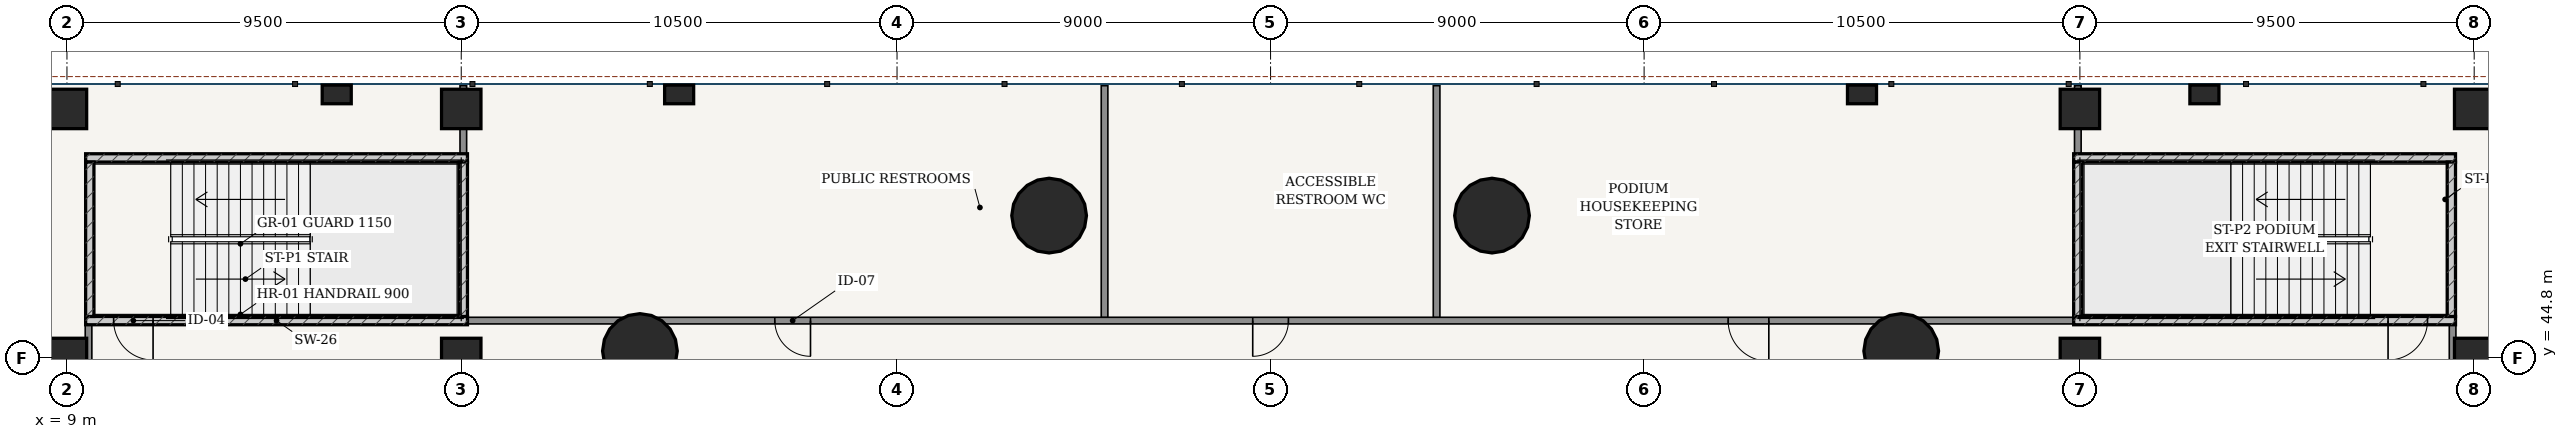
"""IFC4 building model, lengths in metres.
Left out: names, types, materials, properties, quantities, classifications, styles, units other than length and angle.
Written with IfcOpenShell. Run it as: python <this file> out.ifc"""

import sys

from ifc_helpers import new_model, si_unit, direction, frame, frame_2d, origin, origin_2d, place, context, subcontext, project, spatial, rectangle, hollow_circle, extrude, source, transform, mapped, element, fill, save


model = new_model("IFC4")
c1 = context("Model", 3, precision=1e-05, world=origin(), true_north=direction((-0.2419218956, 0.970295726276)))
c2 = subcontext(c1, "Body", "Model", "MODEL_VIEW")
j1 = project(units=[si_unit("LENGTHUNIT", "METRE"), si_unit("PLANEANGLEUNIT", "RADIAN")], contexts=[c1])
p1 = place(None, origin())
s1 = spatial("IfcSite", under=j1, at=p1, CompositionType="ELEMENT")
p2 = place(p1, origin())
s2 = spatial("IfcBuilding", under=s1, at=p2, CompositionType="ELEMENT")
p3 = place(p2, frame((0.0, 0.0, 14.4)))
s3 = spatial("IfcBuildingStorey", under=s2, at=p3, CompositionType="ELEMENT", Elevation=14.4)
p4 = place(p3, frame((9.45, 45.7, 0.0), z_axis=(0.0, 0.0, 1.0), x_axis=(1.0, 0.0, 0.0)))
e1 = element("IfcWall", 1, at=p4, inside=s3, PredefinedType="SOLIDWALL", context=c2, shape_type="SweptSolid", body=[
    extrude(rectangle(XDim=9.2, YDim=0.2, at=frame_2d((4.6, 0.0))), origin(), (0.0, 0.0, 1.0), 4.05),
])
p5 = place(p4, frame((0.675, 0.0, 0.0)))
e2 = element("IfcOpeningElement", 2, at=p5, cuts=e1, PredefinedType="OPENING", context=c2, shape_type="SweptSolid", body=[
    extrude(rectangle(XDim=0.95, YDim=2.15, at=frame_2d((0.475, 1.075))), frame((0.0, 0.11, 0.0), z_axis=(0.0, -1.0, 0.0), x_axis=(1.0, 0.0, 0.0)), (0.0, 0.0, 1.0), 0.22),
])
p6 = place(p3, frame((9.45, 49.62, 0.0), z_axis=(0.0, 0.0, 1.0), x_axis=(1.0, 0.0, 0.0)))
e3 = element("IfcWall", 3, at=p6, inside=s3, PredefinedType="SOLIDWALL", context=c2, shape_type="SweptSolid", body=[
    extrude(rectangle(XDim=9.2, YDim=0.2, at=frame_2d((4.6, 0.0))), origin(), (0.0, 0.0, 1.0), 4.05),
])
for number, where, z_axis, x_axis in (
    (4, (9.55, 45.8, 0.0), (0.0, 0.0, 1.0), (0.0, 1.0, 0.0)),
    (5, (18.55, 45.8, 0.0), (0.0, 0.0, 1.0), (0.0, 1.0, 0.0)),
):
    element("IfcWall", number, at=place(p3, frame(where, z_axis=z_axis, x_axis=x_axis)), inside=s3, PredefinedType="SOLIDWALL", context=c2, shape_type="SweptSolid", body=[
        extrude(rectangle(XDim=3.72, YDim=0.2, at=frame_2d((1.86, 0.0))), origin(), (0.0, 0.0, 1.0), 4.05),
    ])
p7 = place(p3, frame((57.35, 45.7, 0.0), z_axis=(0.0, 0.0, 1.0), x_axis=(1.0, 0.0, 0.0)))
e6 = element("IfcWall", 6, at=p7, inside=s3, PredefinedType="SOLIDWALL", context=c2, shape_type="SweptSolid", body=[
    extrude(rectangle(XDim=9.2, YDim=0.2, at=frame_2d((4.6, 0.0))), origin(), (0.0, 0.0, 1.0), 4.05),
])
p8 = place(p7, frame((7.575, 0.0, 0.0)))
e7 = element("IfcOpeningElement", 7, at=p8, cuts=e6, PredefinedType="OPENING", context=c2, shape_type="SweptSolid", body=[
    extrude(rectangle(XDim=0.95, YDim=2.15, at=frame_2d((0.475, 1.075))), frame((0.0, 0.11, 0.0), z_axis=(0.0, -1.0, 0.0), x_axis=(1.0, 0.0, 0.0)), (0.0, 0.0, 1.0), 0.22),
])
p9 = place(p3, frame((57.35, 49.62, 0.0), z_axis=(0.0, 0.0, 1.0), x_axis=(1.0, 0.0, 0.0)))
e8 = element("IfcWall", 8, at=p9, inside=s3, PredefinedType="SOLIDWALL", context=c2, shape_type="SweptSolid", body=[
    extrude(rectangle(XDim=9.2, YDim=0.2, at=frame_2d((4.6, 0.0))), origin(), (0.0, 0.0, 1.0), 4.05),
])
for number, where, z_axis, x_axis in (
    (9, (57.45, 45.8, 0.0), (0.0, 0.0, 1.0), (0.0, 1.0, 0.0)),
    (10, (66.45, 45.8, 0.0), (0.0, 0.0, 1.0), (0.0, 1.0, 0.0)),
):
    element("IfcWall", number, at=place(p3, frame(where, z_axis=z_axis, x_axis=x_axis)), inside=s3, PredefinedType="SOLIDWALL", context=c2, shape_type="SweptSolid", body=[
        extrude(rectangle(XDim=3.72, YDim=0.2, at=frame_2d((1.86, 0.0))), origin(), (0.0, 0.0, 1.0), 4.05),
    ])
for number, where, z_axis, x_axis in (
    (11, (53.195, 44.968, 0.0), (0.0, 0.0, 1.0), (1.0, 0.0, 0.0)),
    (12, (43.336, 48.23, 0.0), (0.0, 0.0, 1.0), (1.0, 0.0, 0.0)),
    (13, (32.664, 48.23, 0.0), (0.0, 0.0, 1.0), (1.0, 0.0, 0.0)),
    (14, (22.805, 44.968, 0.0), (0.0, 0.0, 1.0), (1.0, 0.0, 0.0)),
):
    element("IfcColumn", number, at=place(p3, frame(where, z_axis=z_axis, x_axis=x_axis)), inside=s3, PredefinedType="COLUMN", context=c2, shape_type="SweptSolid", body=[
        extrude(hollow_circle(Radius=0.9, WallThickness=0.055, at=origin_2d()), origin(), (0.0, 0.0, 1.0), 4.5),
    ])
for number, where, z_axis, x_axis in (
    (15, (9.0, 44.8, 0.0), (0.0, 0.0, 1.0), (1.0, 0.0, 0.0)),
    (16, (9.0, 50.8, 0.0), (0.0, 0.0, 1.0), (1.0, 0.0, 0.0)),
    (17, (18.5, 44.8, 0.0), (0.0, 0.0, 1.0), (1.0, 0.0, 0.0)),
    (18, (18.5, 50.8, 0.0), (0.0, 0.0, 1.0), (1.0, 0.0, 0.0)),
    (19, (57.5, 44.8, 0.0), (0.0, 0.0, 1.0), (1.0, 0.0, 0.0)),
    (20, (57.5, 50.8, 0.0), (0.0, 0.0, 1.0), (1.0, 0.0, 0.0)),
    (21, (67.0, 44.8, 0.0), (0.0, 0.0, 1.0), (1.0, 0.0, 0.0)),
    (22, (67.0, 50.8, 0.0), (0.0, 0.0, 1.0), (1.0, 0.0, 0.0)),
):
    element("IfcColumn", number, at=place(p3, frame(where, z_axis=z_axis, x_axis=x_axis)), inside=s3, PredefinedType="COLUMN", context=c2, shape_type="SweptSolid", body=[
        extrude(rectangle(XDim=0.95, YDim=0.95, at=origin_2d()), origin(), (0.0, 0.0, 1.0), 4.5),
    ])
for number, where, z_axis, x_axis in (
    (23, (15.5, 51.15, 0.0), (0.0, 0.0, 1.0), (1.0, 0.0, 0.0)),
    (24, (23.75, 51.15, 0.0), (0.0, 0.0, 1.0), (1.0, 0.0, 0.0)),
    (25, (52.25, 51.15, 0.0), (0.0, 0.0, 1.0), (1.0, 0.0, 0.0)),
    (26, (60.5, 51.15, 0.0), (0.0, 0.0, 1.0), (1.0, 0.0, 0.0)),
):
    element("IfcColumn", number, at=place(p3, frame(where, z_axis=z_axis, x_axis=x_axis)), inside=s3, PredefinedType="PILASTER", context=c2, shape_type="SweptSolid", body=[
        extrude(rectangle(XDim=0.7, YDim=0.45, at=origin_2d()), origin(), (0.0, 0.0, 1.0), 4.5),
    ])
for number, where, z_axis, x_axis in (
    (27, (9.52, 36.92, 0.0), (0.0, 0.0, 1.0), (0.0, 1.0, 0.0)),
    (28, (66.48, 36.92, 0.0), (0.0, 0.0, 1.0), (0.0, 1.0, 0.0)),
):
    element("IfcWall", number, at=place(p3, frame(where, z_axis=z_axis, x_axis=x_axis)), inside=s3, PredefinedType="PARTITIONING", context=c2, shape_type="SweptSolid", body=[
        extrude(rectangle(XDim=8.78, YDim=0.16, at=frame_2d((4.39, 0.0))), origin(), (0.0, 0.0, 1.0), 2.435),
    ])
p10 = place(p3, frame((18.55, 45.7, 0.0), z_axis=(0.0, 0.0, 1.0), x_axis=(1.0, 0.0, 0.0)))
e29 = element("IfcWall", 29, at=p10, inside=s3, PredefinedType="PARTITIONING", context=c2, shape_type="SweptSolid", body=[
    extrude(rectangle(XDim=38.9, YDim=0.16, at=frame_2d((19.45, 0.0))), origin(), (0.0, 0.0, 1.0), 3.4),
])
p11 = place(p10, frame((7.505, 0.0, 0.0)))
e30 = element("IfcOpeningElement", 30, at=p11, cuts=e29, PredefinedType="OPENING", context=c2, shape_type="SweptSolid", body=[
    extrude(rectangle(XDim=0.86, YDim=2.1, at=frame_2d((0.43, 1.05))), frame((0.0, 0.09, 0.0), z_axis=(0.0, -1.0, 0.0), x_axis=(1.0, 0.0, 0.0)), (0.0, 0.0, 1.0), 0.18),
])
p12 = place(p10, frame((19.02, 0.0, 0.0)))
e31 = element("IfcOpeningElement", 31, at=p12, cuts=e29, PredefinedType="OPENING", context=c2, shape_type="SweptSolid", body=[
    extrude(rectangle(XDim=0.86, YDim=2.1, at=frame_2d((0.43, 1.05))), frame((0.0, 0.09, 0.0), z_axis=(0.0, -1.0, 0.0), x_axis=(1.0, 0.0, 0.0)), (0.0, 0.0, 1.0), 0.18),
])
p13 = place(p10, frame((30.475, 0.0, 0.0)))
e32 = element("IfcOpeningElement", 32, at=p13, cuts=e29, PredefinedType="OPENING", context=c2, shape_type="SweptSolid", body=[
    extrude(rectangle(XDim=0.98, YDim=2.2, at=frame_2d((0.49, 1.1))), frame((0.0, 0.09, 0.0), z_axis=(0.0, -1.0, 0.0), x_axis=(1.0, 0.0, 0.0)), (0.0, 0.0, 1.0), 0.18),
])
for number, where, z_axis, x_axis in (
    (33, (34.0, 45.782, 0.0), (0.0, 0.0, 1.0), (0.0, 1.0, 0.0)),
    (34, (42.0, 45.782, 0.0), (0.0, 0.0, 1.0), (0.0, 1.0, 0.0)),
):
    element("IfcWall", number, at=place(p3, frame(where, z_axis=z_axis, x_axis=x_axis)), inside=s3, PredefinedType="PARTITIONING", context=c2, shape_type="SweptSolid", body=[
        extrude(rectangle(XDim=5.578, YDim=0.16, at=frame_2d((2.789, 0.0))), origin(), (0.0, 0.0, 1.0), 3.492),
    ])
for number, where, z_axis, x_axis in (
    (35, (18.55, 49.722, 0.0), (0.0, 0.0, 1.0), (0.0, 1.0, 0.0)),
    (36, (57.45, 49.722, 0.0), (0.0, 0.0, 1.0), (0.0, 1.0, 0.0)),
):
    element("IfcWall", number, at=place(p3, frame(where, z_axis=z_axis, x_axis=x_axis)), inside=s3, PredefinedType="PARTITIONING", context=c2, shape_type="SweptSolid", body=[
        extrude(rectangle(XDim=1.638, YDim=0.16, at=frame_2d((0.819, 0.0))), origin(), (0.0, 0.0, 1.0), 3.085),
    ])
m1 = source(origin(), c2, "Body", "SweptSolid", [
    extrude(rectangle(XDim=0.95, YDim=2.15, at=frame_2d((0.475, 1.075))), frame((0.0, 0.025, 0.0), z_axis=(0.0, -1.0, 0.0), x_axis=(1.0, 0.0, 0.0)), (0.0, 0.0, 1.0), 0.05),
])
p14 = place(p5, frame((0.95, 0.0, 0.0), z_axis=(0.0, 0.0, 1.0), x_axis=(-1.0, 0.0, 0.0)))
e37 = element("IfcDoor", 37, at=p14, inside=s3, OperationType="SINGLE_SWING_LEFT", PredefinedType="DOOR", context=c2, shape_type="MappedRepresentation", body=[
    mapped(m1, transform((0.0, 0.0, 0.0), scale=1.0)),
])
fill(e2, e37)
p15 = place(p8, frame((0.95, 0.0, 0.0), z_axis=(0.0, 0.0, 1.0), x_axis=(-1.0, 0.0, 0.0)))
e38 = element("IfcDoor", 38, at=p15, inside=s3, OperationType="SINGLE_SWING_RIGHT", PredefinedType="DOOR", context=c2, shape_type="MappedRepresentation", body=[
    mapped(m1, transform((0.0, 0.0, 0.0), scale=1.0)),
])
fill(e7, e38)
m2 = source(origin(), c2, "Body", "SweptSolid", [
    extrude(rectangle(XDim=0.86, YDim=2.1, at=frame_2d((0.43, 1.05))), frame((0.0, 0.025, 0.0), z_axis=(0.0, -1.0, 0.0), x_axis=(1.0, 0.0, 0.0)), (0.0, 0.0, 1.0), 0.05),
])
p16 = place(p11, frame((0.86, 0.0, 0.0), z_axis=(0.0, 0.0, 1.0), x_axis=(-1.0, 0.0, 0.0)))
e39 = element("IfcDoor", 39, at=p16, inside=s3, OperationType="SINGLE_SWING_LEFT", PredefinedType="DOOR", context=c2, shape_type="MappedRepresentation", body=[
    mapped(m2, transform((0.0, 0.0, 0.0), scale=1.0)),
])
fill(e30, e39)
p17 = place(p12, frame((0.86, 0.0, 0.0), z_axis=(0.0, 0.0, 1.0), x_axis=(-1.0, 0.0, 0.0)))
e40 = element("IfcDoor", 40, at=p17, inside=s3, OperationType="SINGLE_SWING_RIGHT", PredefinedType="DOOR", context=c2, shape_type="MappedRepresentation", body=[
    mapped(m2, transform((0.0, 0.0, 0.0), scale=1.0)),
])
fill(e31, e40)
m3 = source(origin(), c2, "Body", "SweptSolid", [
    extrude(rectangle(XDim=0.98, YDim=2.2, at=frame_2d((0.49, 1.1))), frame((0.0, 0.025, 0.0), z_axis=(0.0, -1.0, 0.0), x_axis=(1.0, 0.0, 0.0)), (0.0, 0.0, 1.0), 0.05),
])
p18 = place(p13, frame((0.98, 0.0, 0.0), z_axis=(0.0, 0.0, 1.0), x_axis=(-1.0, 0.0, 0.0)))
e41 = element("IfcDoor", 41, at=p18, inside=s3, OperationType="SINGLE_SWING_LEFT", PredefinedType="DOOR", context=c2, shape_type="MappedRepresentation", body=[
    mapped(m3, transform((0.0, 0.0, 0.0), scale=1.0)),
])
fill(e32, e41)
save(model, sys.argv[1])
